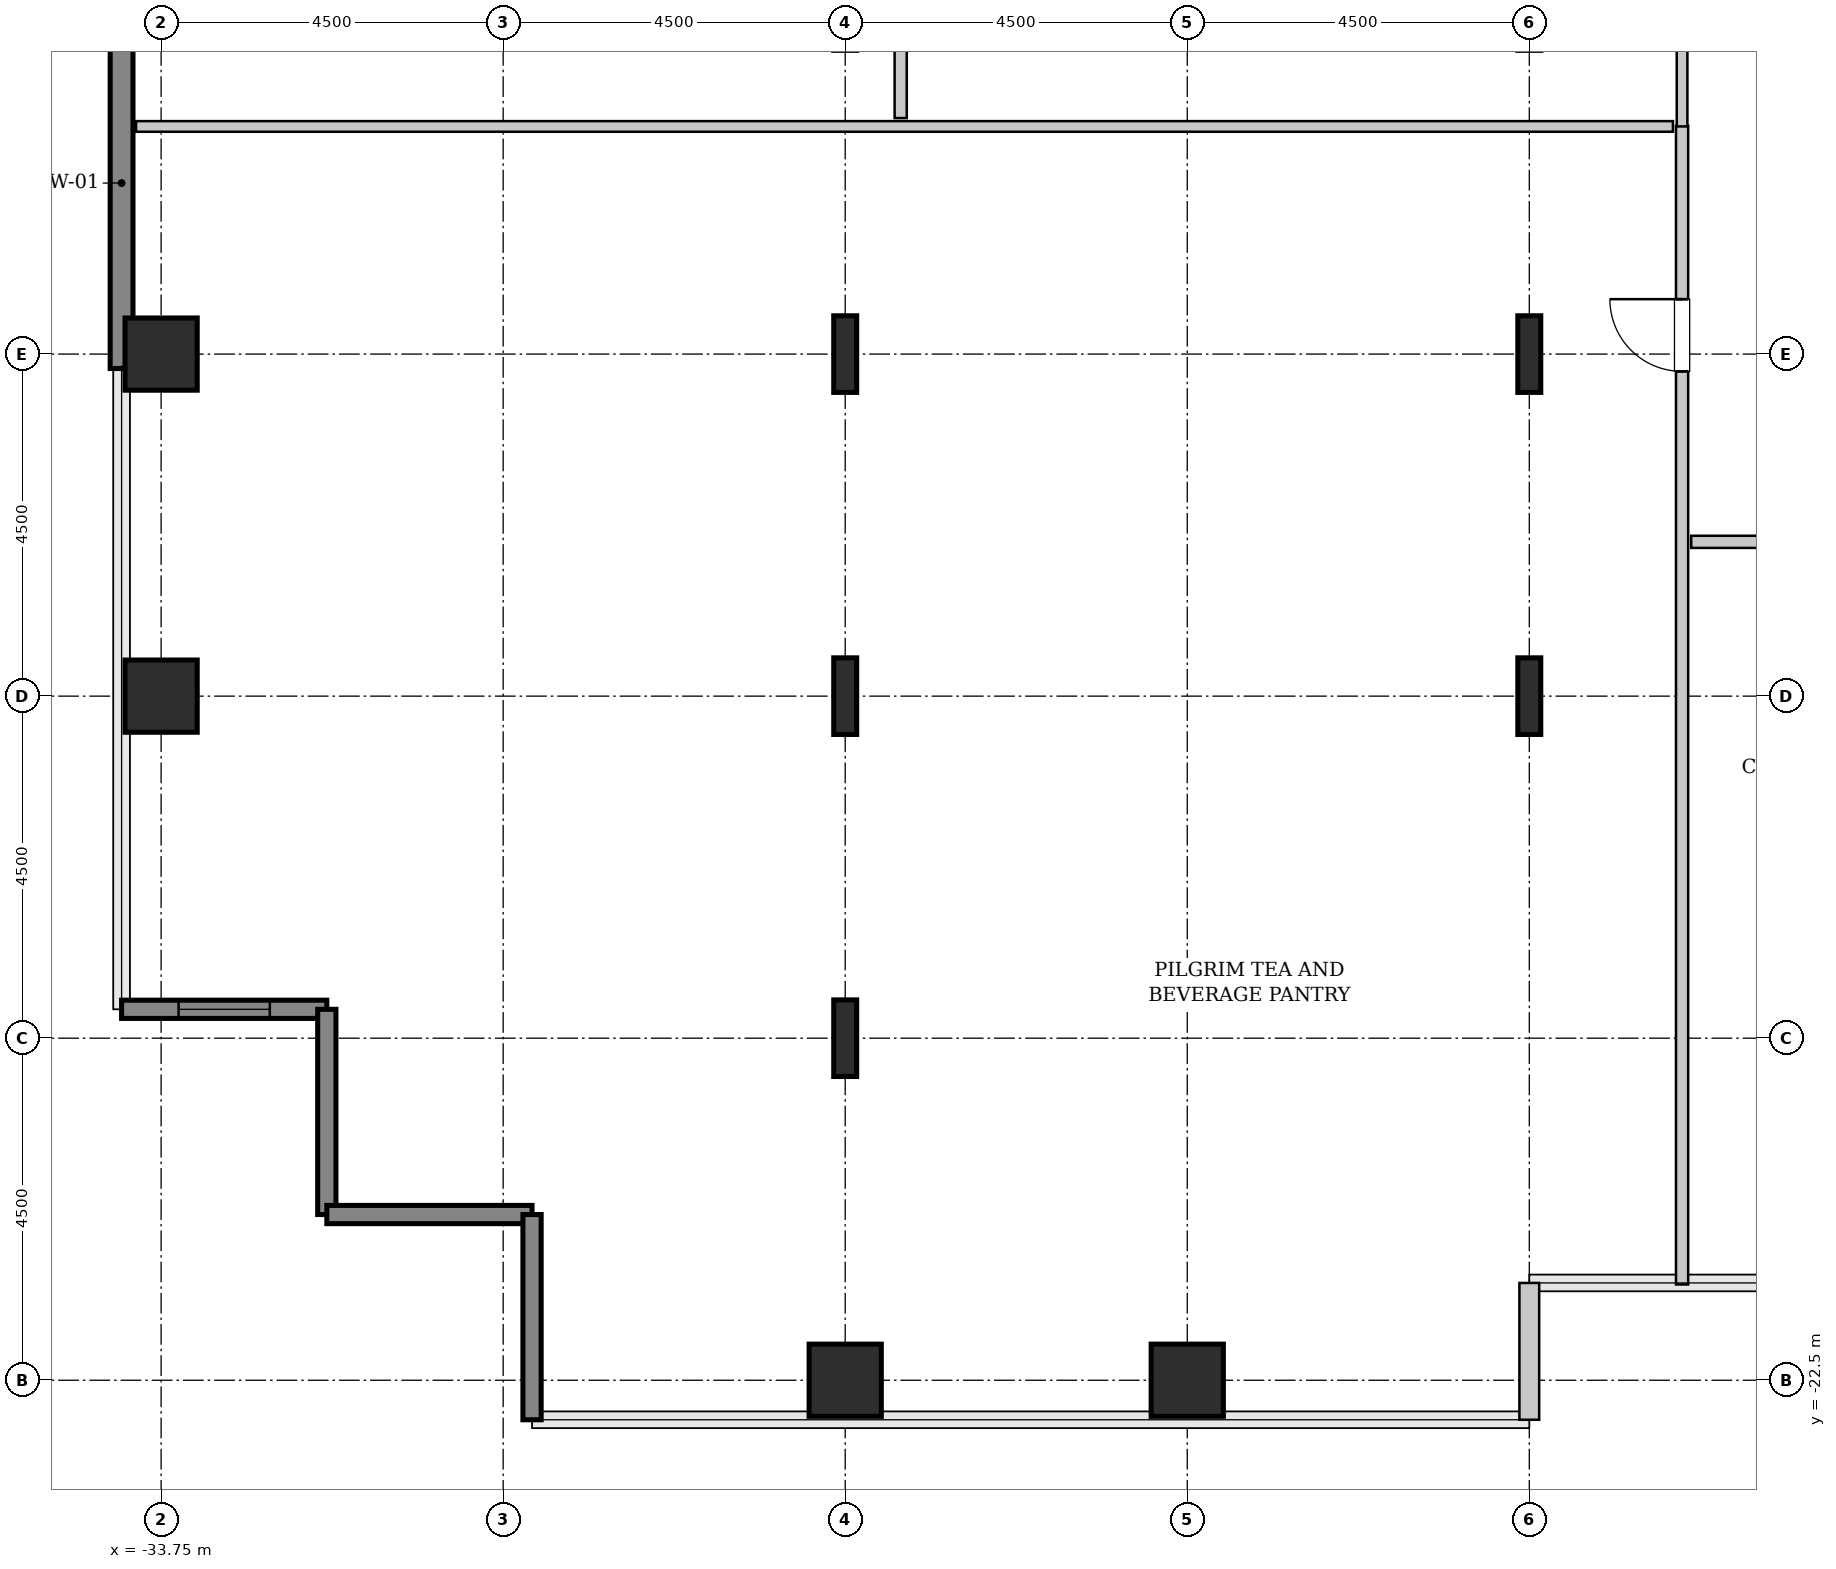
"""IFC4 building model, lengths in metres.
Left out: names, types, materials, properties, quantities, classifications, styles, units other than length and angle.
Written with IfcOpenShell. Run it as: python <this file> out.ifc"""

import sys

from ifc_helpers import new_model, si_unit, direction, frame, frame_2d, origin, origin_2d, place, context, subcontext, project, spatial, rectangle, hollow_rectangle, i_section, extrude, source, transform, mapped, element, fill, save


model = new_model("IFC4")
c1 = context("Model", 3, precision=1e-05, world=origin(), true_north=direction((0.0, 1.0)))
c2 = subcontext(c1, "Body", "Model", "MODEL_VIEW")
j1 = project(units=[si_unit("LENGTHUNIT", "METRE"), si_unit("PLANEANGLEUNIT", "RADIAN")], contexts=[c1])
p1 = place(None, origin())
s1 = spatial("IfcSite", under=j1, at=p1, CompositionType="ELEMENT")
p2 = place(p1, origin())
s2 = spatial("IfcBuilding", under=s1, at=p2, CompositionType="ELEMENT")
p3 = place(p2, frame((0.0, 0.0, 55.8)))
s3 = spatial("IfcBuildingStorey", under=s2, at=p3, CompositionType="ELEMENT", Elevation=55.8)
m1 = source(origin(), c2, "Body", "SweptSolid", [
    extrude(hollow_rectangle(XDim=0.95, YDim=0.95, WallThickness=0.045, InnerFilletRadius=0.045, OuterFilletRadius=0.09, at=origin_2d()), origin(), (0.0, 0.0, 1.0), 3.8),
])
for number, where, z_axis, x_axis in (
    (1, (-33.75, -13.5, 0.0), (0.0, 0.0, 1.0), (1.0, 0.0, 0.0)),
    (2, (-33.75, -9.0, 0.0), (0.0, 0.0, 1.0), (1.0, 0.0, 0.0)),
    (3, (-24.75, -22.5, 0.0), (0.0, 0.0, 1.0), (1.0, 0.0, 0.0)),
):
    element("IfcColumn", number, at=place(p3, frame(where, z_axis=z_axis, x_axis=x_axis)), inside=s3, PredefinedType="COLUMN", context=c2, shape_type="MappedRepresentation", body=[
        mapped(m1, transform((0.0, 0.0, 0.0), x_axis=(1.0, 0.0, 0.0), y_axis=(0.0, 1.0, 0.0), z_axis=(0.0, 0.0, 1.0), scale=1.0)),
    ])
m2 = source(origin(), c2, "Body", "SweptSolid", [
    extrude(i_section(OverallWidth=0.302, OverallDepth=1.008, WebThickness=0.021, FlangeThickness=0.04, FilletRadius=0.03, at=origin_2d()), origin(), (0.0, 0.0, 1.0), 3.8),
])
for number, where, z_axis, x_axis in (
    (4, (-24.75, -18.0, 0.0), (0.0, 0.0, 1.0), (1.0, 0.0, 0.0)),
    (5, (-24.75, -13.5, 0.0), (0.0, 0.0, 1.0), (1.0, 0.0, 0.0)),
    (6, (-24.75, -9.0, 0.0), (0.0, 0.0, 1.0), (1.0, 0.0, 0.0)),
):
    element("IfcColumn", number, at=place(p3, frame(where, z_axis=z_axis, x_axis=x_axis)), inside=s3, PredefinedType="COLUMN", context=c2, shape_type="MappedRepresentation", body=[
        mapped(m2, transform((0.0, 0.0, 0.0), x_axis=(1.0, 0.0, 0.0), y_axis=(0.0, 1.0, 0.0), z_axis=(0.0, 0.0, 1.0), scale=1.0)),
    ])
p4 = place(p3, frame((-20.25, -22.5, 0.0), z_axis=(0.0, 0.0, 1.0), x_axis=(1.0, 0.0, 0.0)))
e7 = element("IfcColumn", 7, at=p4, inside=s3, PredefinedType="COLUMN", context=c2, shape_type="MappedRepresentation", body=[
    mapped(m1, transform((0.0, 0.0, 0.0), x_axis=(1.0, 0.0, 0.0), y_axis=(0.0, 1.0, 0.0), z_axis=(0.0, 0.0, 1.0), scale=1.0)),
])
for number, where, z_axis, x_axis in (
    (8, (-15.75, -13.5, 0.0), (0.0, 0.0, 1.0), (1.0, 0.0, 0.0)),
    (9, (-15.75, -9.0, 0.0), (0.0, 0.0, 1.0), (1.0, 0.0, 0.0)),
):
    element("IfcColumn", number, at=place(p3, frame(where, z_axis=z_axis, x_axis=x_axis)), inside=s3, PredefinedType="COLUMN", context=c2, shape_type="MappedRepresentation", body=[
        mapped(m2, transform((0.0, 0.0, 0.0), x_axis=(1.0, 0.0, 0.0), y_axis=(0.0, 1.0, 0.0), z_axis=(0.0, 0.0, 1.0), scale=1.0)),
    ])
m3 = source(origin(), c2, "Body", "SweptSolid", [
    extrude(rectangle(XDim=4.88, YDim=0.3, at=frame_2d((2.44, 0.0))), origin(), (0.0, 0.0, 1.0), 3.55),
])
p5 = place(p3, frame((-34.27, -9.19, 0.0), z_axis=(0.0, 0.0, 1.0), x_axis=(0.0, 1.0, 0.0)))
e10 = element("IfcWall", 10, at=p5, inside=s3, PredefinedType="SHEAR", context=c2, shape_type="MappedRepresentation", body=[
    mapped(m3, transform((0.0, 0.0, 0.0), x_axis=(1.0, 0.0, 0.0), y_axis=(0.0, 1.0, 0.0), z_axis=(0.0, 0.0, 1.0), scale=1.0)),
])
m4 = source(origin(), c2, "Body", "SweptSolid", [
    extrude(rectangle(XDim=2.7, YDim=0.24, at=frame_2d((1.35, 0.0))), origin(), (0.0, 0.0, 1.0), 3.55),
])
p6 = place(p3, frame((-34.27, -17.62, 0.0), z_axis=(0.0, 0.0, 1.0), x_axis=(1.0, 0.0, 0.0)))
e11 = element("IfcWall", 11, at=p6, inside=s3, PredefinedType="SHEAR", context=c2, shape_type="MappedRepresentation", body=[
    mapped(m4, transform((0.0, 0.0, 0.0), x_axis=(1.0, 0.0, 0.0), y_axis=(0.0, 1.0, 0.0), z_axis=(0.0, 0.0, 1.0), scale=1.0)),
])
p7 = place(p6, frame((0.75, 0.0, 0.85)))
e12 = element("IfcOpeningElement", 12, at=p7, cuts=e11, PredefinedType="OPENING", context=c2, shape_type="SweptSolid", body=[
    extrude(rectangle(XDim=1.2, YDim=1.8, at=frame_2d((0.6, 0.9))), frame((0.0, 0.13, 0.0), z_axis=(0.0, -1.0, 0.0), x_axis=(1.0, 0.0, 0.0)), (0.0, 0.0, 1.0), 0.26),
])
for number, where, z_axis, x_axis in (
    (13, (-31.57, -17.62, 0.0), (0.0, 0.0, 1.0), (0.0, -1.0, 0.0)),
    (14, (-31.57, -20.32, 0.0), (0.0, 0.0, 1.0), (1.0, 0.0, 0.0)),
    (15, (-28.87, -20.32, 0.0), (0.0, 0.0, 1.0), (0.0, -1.0, 0.0)),
):
    element("IfcWall", number, at=place(p3, frame(where, z_axis=z_axis, x_axis=x_axis)), inside=s3, PredefinedType="SHEAR", context=c2, shape_type="MappedRepresentation", body=[
        mapped(m4, transform((0.0, 0.0, 0.0), x_axis=(1.0, 0.0, 0.0), y_axis=(0.0, 1.0, 0.0), z_axis=(0.0, 0.0, 1.0), scale=1.0)),
    ])
m5 = source(origin(), c2, "Body", "SweptSolid", [
    extrude(rectangle(XDim=1.8, YDim=0.26, at=frame_2d((0.9, 0.0))), origin(), (0.0, 0.0, 1.0), 3.55),
])
p8 = place(p3, frame((-15.75, -23.02, 0.0), z_axis=(0.0, 0.0, 1.0), x_axis=(0.0, 1.0, 0.0)))
e16 = element("IfcWall", 16, at=p8, inside=s3, PredefinedType="SOLIDWALL", context=c2, shape_type="MappedRepresentation", body=[
    mapped(m5, transform((0.0, 0.0, 0.0), x_axis=(1.0, 0.0, 0.0), y_axis=(0.0, 1.0, 0.0), z_axis=(0.0, 0.0, 1.0), scale=1.0)),
])
m6 = source(origin(), c2, "Body", "SweptSolid", [
    extrude(rectangle(XDim=15.245, YDim=0.16, at=frame_2d((7.623, 0.0))), origin(), (0.0, 0.0, 1.0), 3.535),
])
p9 = place(p3, frame((-13.74, -21.24, 0.0), z_axis=(0.0, 0.0, 1.0), x_axis=(0.0, 1.0, 0.0)))
e17 = element("IfcWall", 17, at=p9, inside=s3, PredefinedType="PARTITIONING", context=c2, shape_type="MappedRepresentation", body=[
    mapped(m6, transform((0.0, 0.0, 0.0), x_axis=(1.0, 0.0, 0.0), y_axis=(0.0, 1.0, 0.0), z_axis=(0.0, 0.0, 1.0), scale=1.0)),
])
p10 = place(p9, frame((12.012, 0.0, 0.0)))
e18 = element("IfcOpeningElement", 18, at=p10, cuts=e17, PredefinedType="OPENING", context=c2, shape_type="SweptSolid", body=[
    extrude(rectangle(XDim=0.95, YDim=2.1, at=frame_2d((0.475, 1.05))), frame((0.0, 0.09, 0.0), z_axis=(0.0, -1.0, 0.0), x_axis=(1.0, 0.0, 0.0)), (0.0, 0.0, 1.0), 0.18),
])
m7 = source(origin(), c2, "Body", "SweptSolid", [
    extrude(rectangle(XDim=20.22, YDim=0.14, at=frame_2d((10.11, 0.0))), origin(), (0.0, 0.0, 1.0), 3.535),
])
p11 = place(p3, frame((-34.08, -6.005, 0.0), z_axis=(0.0, 0.0, 1.0), x_axis=(1.0, 0.0, 0.0)))
e19 = element("IfcWall", 19, at=p11, inside=s3, PredefinedType="PARTITIONING", context=c2, shape_type="MappedRepresentation", body=[
    mapped(m7, transform((0.0, 0.0, 0.0), x_axis=(1.0, 0.0, 0.0), y_axis=(0.0, 1.0, 0.0), z_axis=(0.0, 0.0, 1.0), scale=1.0)),
])
m8 = source(origin(), c2, "Body", "SweptSolid", [
    extrude(rectangle(XDim=7.265, YDim=0.14, at=frame_2d((3.632, 0.0))), origin(), (0.0, 0.0, 1.0), 3.535),
])
p12 = place(p3, frame((-13.74, -6.005, 0.0), z_axis=(0.0, 0.0, 1.0), x_axis=(0.0, 1.0, 0.0)))
e20 = element("IfcWall", 20, at=p12, inside=s3, PredefinedType="PARTITIONING", context=c2, shape_type="MappedRepresentation", body=[
    mapped(m8, transform((0.0, 0.0, 0.0), x_axis=(1.0, 0.0, 0.0), y_axis=(0.0, 1.0, 0.0), z_axis=(0.0, 0.0, 1.0), scale=1.0)),
])
m9 = source(origin(), c2, "Body", "SweptSolid", [
    extrude(rectangle(XDim=14.282, YDim=0.16, at=frame_2d((7.141, 0.0))), origin(), (0.0, 0.0, 1.0), 3.535),
])
p13 = place(p3, frame((-24.02, -5.895, 0.0), z_axis=(0.0, 0.0, 1.0), x_axis=(0.0, 1.0, 0.0)))
e21 = element("IfcWall", 21, at=p13, inside=s3, PredefinedType="PARTITIONING", context=c2, shape_type="MappedRepresentation", body=[
    mapped(m9, transform((0.0, 0.0, 0.0), x_axis=(1.0, 0.0, 0.0), y_axis=(0.0, 1.0, 0.0), z_axis=(0.0, 0.0, 1.0), scale=1.0)),
])
p14 = place(p13, frame((7.67, 0.0, 0.0)))
e22 = element("IfcOpeningElement", 22, at=p14, cuts=e21, PredefinedType="OPENING", context=c2, shape_type="SweptSolid", body=[
    extrude(rectangle(XDim=0.95, YDim=2.1, at=frame_2d((0.475, 1.05))), frame((0.0, 0.09, 0.0), z_axis=(0.0, -1.0, 0.0), x_axis=(1.0, 0.0, 0.0)), (0.0, 0.0, 1.0), 0.18),
])
m10 = source(origin(), c2, "Body", "SweptSolid", [
    extrude(rectangle(XDim=3.825, YDim=0.16, at=frame_2d((1.913, 0.0))), origin(), (0.0, 0.0, 1.0), 3.535),
])
p15 = place(p3, frame((-13.62, -11.47, 0.0), z_axis=(0.0, 0.0, 1.0), x_axis=(1.0, 0.0, 0.0)))
e23 = element("IfcWall", 23, at=p15, inside=s3, PredefinedType="PARTITIONING", context=c2, shape_type="MappedRepresentation", body=[
    mapped(m10, transform((0.0, 0.0, 0.0), x_axis=(1.0, 0.0, 0.0), y_axis=(0.0, 1.0, 0.0), z_axis=(0.0, 0.0, 1.0), scale=1.0)),
])
p16 = place(p15, frame((1.438, 0.0, 0.0)))
e24 = element("IfcOpeningElement", 24, at=p16, cuts=e23, PredefinedType="OPENING", context=c2, shape_type="SweptSolid", body=[
    extrude(rectangle(XDim=0.95, YDim=2.1, at=frame_2d((0.475, 1.05))), frame((0.0, 0.09, 0.0), z_axis=(0.0, -1.0, 0.0), x_axis=(1.0, 0.0, 0.0)), (0.0, 0.0, 1.0), 0.18),
])
m11 = source(origin(), c2, "Body", "SweptSolid", [
    extrude(rectangle(XDim=1.2, YDim=1.8, at=frame_2d((0.6, 0.9))), frame((0.0, 0.03, 0.0), z_axis=(0.0, -1.0, 0.0), x_axis=(1.0, 0.0, 0.0)), (0.0, 0.0, 1.0), 0.06),
])
p17 = place(p7, origin())
e25 = element("IfcWindow", 25, at=p17, inside=s3, PartitioningType="SINGLE_PANEL", PredefinedType="WINDOW", context=c2, shape_type="MappedRepresentation", body=[
    mapped(m11, transform((0.0, 0.0, 0.0), x_axis=(1.0, 0.0, 0.0), y_axis=(0.0, 1.0, 0.0), z_axis=(0.0, 0.0, 1.0), scale=1.0)),
])
fill(e12, e25)
m12 = source(origin(), c2, "Body", "SweptSolid", [
    extrude(rectangle(XDim=0.95, YDim=2.1, at=frame_2d((0.475, 1.05))), frame((0.0, 0.025, 0.0), z_axis=(0.0, -1.0, 0.0), x_axis=(1.0, 0.0, 0.0)), (0.0, 0.0, 1.0), 0.05),
])
p18 = place(p10, origin())
e26 = element("IfcDoor", 26, at=p18, inside=s3, OperationType="SINGLE_SWING_RIGHT", PredefinedType="DOOR", context=c2, shape_type="MappedRepresentation", body=[
    mapped(m12, transform((0.0, 0.0, 0.0), x_axis=(1.0, 0.0, 0.0), y_axis=(0.0, 1.0, 0.0), z_axis=(0.0, 0.0, 1.0), scale=1.0)),
])
fill(e18, e26)
save(model, sys.argv[1])
